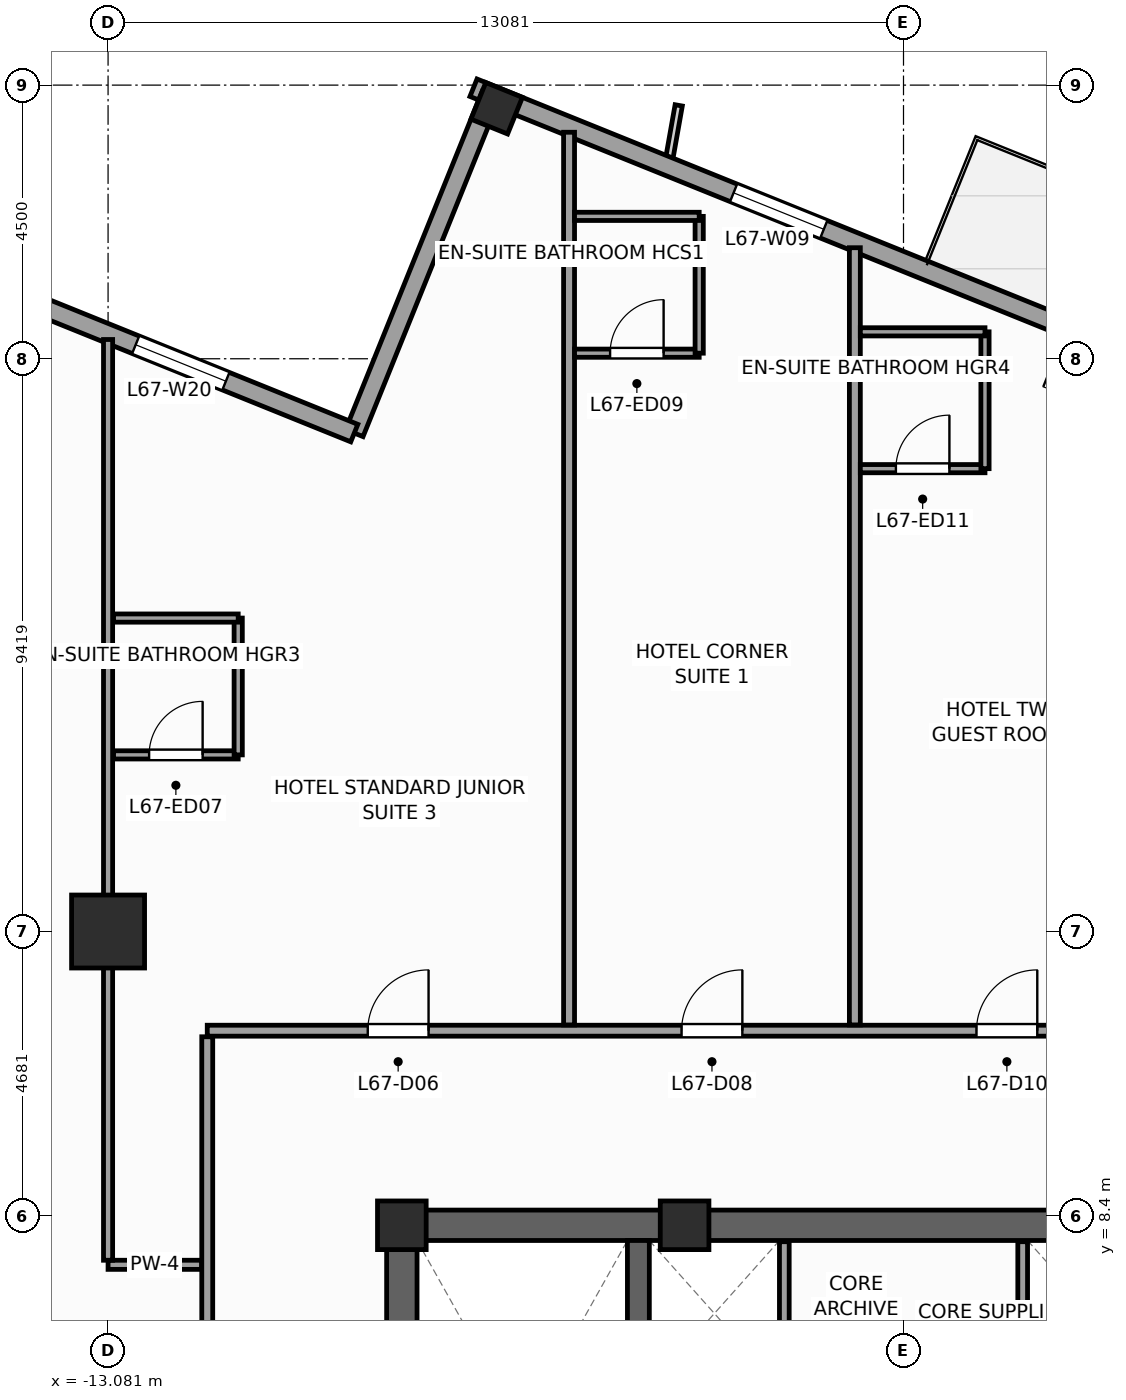
"""IFC4 building model, lengths in metres.
Left out: names, types, materials, properties, quantities, classifications, styles, units other than length and angle.
Written with IfcOpenShell. Run it as: python <this file> out.ifc"""

import sys

from ifc_helpers import new_model, si_unit, direction, frame, frame_2d, origin, origin_2d, place, context, subcontext, project, spatial, rectangle, extrude, source, transform, mapped, element, fill, save


model = new_model("IFC4")
c1 = context("Model", 3, precision=1e-05, world=origin(), true_north=direction((0.0, 1.0)))
c2 = subcontext(c1, "Body", "Model", "MODEL_VIEW")
j1 = project(units=[si_unit("LENGTHUNIT", "METRE"), si_unit("PLANEANGLEUNIT", "RADIAN")], contexts=[c1])
p1 = place(None, origin())
s1 = spatial("IfcSite", under=j1, at=p1, CompositionType="ELEMENT")
p2 = place(p1, origin())
s2 = spatial("IfcBuilding", under=s1, at=p2, CompositionType="ELEMENT")
p3 = place(p2, frame((0.0, 0.0, 276.0)))
s3 = spatial("IfcBuildingStorey", under=s2, at=p3, CompositionType="ELEMENT", Elevation=276.0)
p4 = place(p3, frame((-8.5, 8.25, 0.0), z_axis=(0.0, 0.0, 1.0), x_axis=(1.0, 0.0, 0.0)))
e1 = element("IfcWall", 1, at=p4, inside=s3, PredefinedType="SHEAR", context=c2, shape_type="SweptSolid", body=[
    extrude(rectangle(XDim=17.0, YDim=0.5, at=frame_2d((8.5, 0.0))), origin(), (0.0, 0.0, 1.0), 3.6),
])
p5 = place(p3, frame((-8.25, -8.0, 0.0), z_axis=(0.0, 0.0, 1.0), x_axis=(0.0, 1.0, 0.0)))
e2 = element("IfcWall", 2, at=p5, inside=s3, PredefinedType="SHEAR", context=c2, shape_type="SweptSolid", body=[
    extrude(rectangle(XDim=16.0, YDim=0.5, at=frame_2d((8.0, 0.0))), origin(), (0.0, 0.0, 1.0), 3.6),
])
p6 = place(p5, frame((4.69, 0.0, 0.0)))
e3 = element("IfcOpeningElement", 3, at=p6, cuts=e2, PredefinedType="OPENING", context=c2, shape_type="SweptSolid", body=[
    extrude(rectangle(XDim=1.3, YDim=2.2, at=frame_2d((0.65, 1.1))), frame((0.0, 0.26, 0.0), z_axis=(0.0, -1.0, 0.0), x_axis=(1.0, 0.0, 0.0)), (0.0, 0.0, 1.0), 0.52),
])
p7 = place(p3, frame((-4.36, -8.0, 0.0), z_axis=(0.0, 0.0, 1.0), x_axis=(0.0, 1.0, 0.0)))
e4 = element("IfcWall", 4, at=p7, inside=s3, PredefinedType="SHEAR", context=c2, shape_type="SweptSolid", body=[
    extrude(rectangle(XDim=16.0, YDim=0.36, at=frame_2d((8.0, 0.0))), origin(), (0.0, 0.0, 1.0), 3.6),
])
m1 = source(origin(), c2, "Body", "SweptSolid", [
    extrude(rectangle(XDim=0.8, YDim=0.8, at=origin_2d()), origin(), (0.0, 0.0, 1.0), 3.6),
])
for number, where, z_axis, x_axis in (
    (5, (-8.25, 8.25, 0.0), (0.0, 0.0, 1.0), (1.0, 0.0, 0.0)),
    (6, (-3.6, 8.25, 0.0), (0.0, 0.0, 1.0), (1.0, 0.0, 0.0)),
):
    element("IfcColumn", number, at=place(p3, frame(where, z_axis=z_axis, x_axis=x_axis)), inside=s3, PredefinedType="PILASTER", context=c2, shape_type="MappedRepresentation", body=[
        mapped(m1, transform((0.0, 0.0, 0.0), scale=1.0)),
    ])
m2 = source(origin(), c2, "Body", "SweptSolid", [
    extrude(rectangle(XDim=1.2, YDim=1.2, at=origin_2d()), origin(), (0.0, 0.0, 1.0), 3.6),
])
p8 = place(p3, frame((-13.081, 13.081, 0.0), z_axis=(0.0, 0.0, 1.0), x_axis=(1.0, 0.0, 0.0)))
e7 = element("IfcColumn", 7, at=p8, inside=s3, PredefinedType="COLUMN", context=c2, shape_type="MappedRepresentation", body=[
    mapped(m2, transform((0.0, 0.0, 0.0), scale=1.0)),
])
m3 = source(origin(), c2, "Body", "SweptSolid", [
    extrude(rectangle(XDim=0.65, YDim=0.65, at=origin_2d()), origin(), (0.0, 0.0, 1.0), 3.6),
])
p9 = place(p3, frame((-6.69, 26.62, 0.0), z_axis=(0.0, 0.0, 1.0), x_axis=(0.374606593416, 0.927183854567, 0.0)))
e8 = element("IfcColumn", 8, at=p9, inside=s3, PredefinedType="COLUMN", context=c2, shape_type="MappedRepresentation", body=[
    mapped(m3, transform((0.0, 0.0, 0.0), scale=1.0)),
])
p10 = place(p3, frame((23.813, 14.479, 0.0), z_axis=(0.0, 0.0, 1.0), x_axis=(-0.927182657188, 0.374609557019, 0.0)))
e9 = element("IfcWall", 9, at=p10, inside=s3, PredefinedType="STANDARD", context=c2, shape_type="SweptSolid", body=[
    extrude(rectangle(XDim=33.31, YDim=0.31, at=frame_2d((16.655, 0.0))), origin(), (0.0, 0.0, 1.0), 2.75),
])
p11 = place(p10, frame((21.73, 0.0, 0.0)))
e10 = element("IfcOpeningElement", 10, at=p11, cuts=e9, PredefinedType="OPENING", context=c2, shape_type="SweptSolid", body=[
    extrude(rectangle(XDim=1.05, YDim=2.25, at=frame_2d((0.525, 1.125))), frame((0.0, 0.165, 0.0), z_axis=(0.0, -1.0, 0.0), x_axis=(1.0, 0.0, 0.0)), (0.0, 0.0, 1.0), 0.33),
])
p12 = place(p10, frame((3.197, 0.0, 0.47)))
e11 = element("IfcOpeningElement", 11, at=p12, cuts=e9, PredefinedType="OPENING", context=c2, shape_type="SweptSolid", body=[
    extrude(rectangle(XDim=1.6, YDim=2.1, at=frame_2d((0.8, 1.05))), frame((0.0, 0.165, 0.0), z_axis=(0.0, -1.0, 0.0), x_axis=(1.0, 0.0, 0.0)), (0.0, 0.0, 1.0), 0.33),
])
p13 = place(p10, frame((8.86, 0.0, 0.47)))
e12 = element("IfcOpeningElement", 12, at=p13, cuts=e9, PredefinedType="OPENING", context=c2, shape_type="SweptSolid", body=[
    extrude(rectangle(XDim=1.6, YDim=2.1, at=frame_2d((0.8, 1.05))), frame((0.0, 0.165, 0.0), z_axis=(0.0, -1.0, 0.0), x_axis=(1.0, 0.0, 0.0)), (0.0, 0.0, 1.0), 0.33),
])
p14 = place(p10, frame((14.439, 0.0, 0.47)))
e13 = element("IfcOpeningElement", 13, at=p14, cuts=e9, PredefinedType="OPENING", context=c2, shape_type="SweptSolid", body=[
    extrude(rectangle(XDim=1.6, YDim=2.1, at=frame_2d((0.8, 1.05))), frame((0.0, 0.165, 0.0), z_axis=(0.0, -1.0, 0.0), x_axis=(1.0, 0.0, 0.0)), (0.0, 0.0, 1.0), 0.33),
])
p15 = place(p10, frame((27.097, 0.0, 0.47)))
e14 = element("IfcOpeningElement", 14, at=p15, cuts=e9, PredefinedType="OPENING", context=c2, shape_type="SweptSolid", body=[
    extrude(rectangle(XDim=1.6, YDim=2.1, at=frame_2d((0.8, 1.05))), frame((0.0, 0.165, 0.0), z_axis=(0.0, -1.0, 0.0), x_axis=(1.0, 0.0, 0.0)), (0.0, 0.0, 1.0), 0.33),
])
p16 = place(p3, frame((-6.784, 26.841, 0.0), z_axis=(0.0, 0.0, 1.0), x_axis=(-0.374636620962, -0.927171722085, 0.0)))
e15 = element("IfcWall", 15, at=p16, inside=s3, PredefinedType="STANDARD", context=c2, shape_type="SweptSolid", body=[
    extrude(rectangle(XDim=6.0, YDim=0.31, at=frame_2d((3.0, 0.0))), origin(), (0.0, 0.0, 1.0), 2.65),
])
p17 = place(p3, frame((-9.032, 21.278, 0.0), z_axis=(0.0, 0.0, 1.0), x_axis=(-0.927185411764, 0.374602739196, 0.0)))
e16 = element("IfcWall", 16, at=p17, inside=s3, PredefinedType="STANDARD", context=c2, shape_type="SweptSolid", body=[
    extrude(rectangle(XDim=6.155, YDim=0.31, at=frame_2d((3.078, 0.0))), origin(), (0.0, 0.0, 1.0), 3.35),
])
p18 = place(p17, frame((2.278, 0.0, 0.47)))
e17 = element("IfcOpeningElement", 17, at=p18, cuts=e16, PredefinedType="OPENING", context=c2, shape_type="SweptSolid", body=[
    extrude(rectangle(XDim=1.6, YDim=2.1, at=frame_2d((0.8, 1.05))), frame((0.0, 0.165, 0.0), z_axis=(0.0, -1.0, 0.0), x_axis=(1.0, 0.0, 0.0)), (0.0, 0.0, 1.0), 0.33),
])
for number, where, z_axis, x_axis in (
    (18, (-1.96, 4.58, 0.0), (0.0, 0.0, 1.0), (0.0, 1.0, 0.0)),
    (19, (1.96, 4.58, 0.0), (0.0, 0.0, 1.0), (0.0, 1.0, 0.0)),
):
    element("IfcWall", number, at=place(p3, frame(where, z_axis=z_axis, x_axis=x_axis)), inside=s3, PredefinedType="PARTITIONING", context=c2, shape_type="SweptSolid", body=[
        extrude(rectangle(XDim=3.4, YDim=0.16, at=frame_2d((1.7, 0.0))), origin(), (0.0, 0.0, 1.0), 3.35),
    ])
p19 = place(p3, frame((-11.45, 11.45, 0.0), z_axis=(0.0, 0.0, 1.0), x_axis=(1.0, 0.0, 0.0)))
e20 = element("IfcWall", 20, at=p19, inside=s3, PredefinedType="PARTITIONING", context=c2, shape_type="SweptSolid", body=[
    extrude(rectangle(XDim=21.75, YDim=0.18, at=frame_2d((10.875, 0.0))), origin(), (0.0, 0.0, 1.0), 3.35),
])
p20 = place(p19, frame((2.639, 0.0, 0.0)))
e21 = element("IfcOpeningElement", 21, at=p20, cuts=e20, PredefinedType="OPENING", context=c2, shape_type="SweptSolid", body=[
    extrude(rectangle(XDim=1.0, YDim=2.15, at=frame_2d((0.5, 1.075))), frame((0.0, 0.1, 0.0), z_axis=(0.0, -1.0, 0.0), x_axis=(1.0, 0.0, 0.0)), (0.0, 0.0, 1.0), 0.2),
])
p21 = place(p19, frame((7.8, 0.0, 0.0)))
e22 = element("IfcOpeningElement", 22, at=p21, cuts=e20, PredefinedType="OPENING", context=c2, shape_type="SweptSolid", body=[
    extrude(rectangle(XDim=1.0, YDim=2.15, at=frame_2d((0.5, 1.075))), frame((0.0, 0.1, 0.0), z_axis=(0.0, -1.0, 0.0), x_axis=(1.0, 0.0, 0.0)), (0.0, 0.0, 1.0), 0.2),
])
p22 = place(p19, frame((12.65, 0.0, 0.0)))
e23 = element("IfcOpeningElement", 23, at=p22, cuts=e20, PredefinedType="OPENING", context=c2, shape_type="SweptSolid", body=[
    extrude(rectangle(XDim=1.0, YDim=2.15, at=frame_2d((0.5, 1.075))), frame((0.0, 0.1, 0.0), z_axis=(0.0, -1.0, 0.0), x_axis=(1.0, 0.0, 0.0)), (0.0, 0.0, 1.0), 0.2),
])
p23 = place(p19, frame((18.036, 0.0, 0.0)))
e24 = element("IfcOpeningElement", 24, at=p23, cuts=e20, PredefinedType="OPENING", context=c2, shape_type="SweptSolid", body=[
    extrude(rectangle(XDim=1.0, YDim=2.15, at=frame_2d((0.5, 1.075))), frame((0.0, 0.1, 0.0), z_axis=(0.0, -1.0, 0.0), x_axis=(1.0, 0.0, 0.0)), (0.0, 0.0, 1.0), 0.2),
])
p24 = place(p3, frame((-11.45, -12.35, 0.0), z_axis=(0.0, 0.0, 1.0), x_axis=(0.0, 1.0, 0.0)))
e25 = element("IfcWall", 25, at=p24, inside=s3, PredefinedType="PARTITIONING", context=c2, shape_type="SweptSolid", body=[
    extrude(rectangle(XDim=23.7, YDim=0.18, at=frame_2d((11.85, 0.0))), origin(), (0.0, 0.0, 1.0), 3.35),
])
p25 = place(p24, frame((13.75, 0.0, 0.0)))
e26 = element("IfcOpeningElement", 26, at=p25, cuts=e25, PredefinedType="OPENING", context=c2, shape_type="SweptSolid", body=[
    extrude(rectangle(XDim=1.0, YDim=2.15, at=frame_2d((0.5, 1.075))), frame((0.0, 0.1, 0.0), z_axis=(0.0, -1.0, 0.0), x_axis=(1.0, 0.0, 0.0)), (0.0, 0.0, 1.0), 0.2),
])
p26 = place(p24, frame((17.55, 0.0, 0.0)))
e27 = element("IfcOpeningElement", 27, at=p26, cuts=e25, PredefinedType="OPENING", context=c2, shape_type="SweptSolid", body=[
    extrude(rectangle(XDim=1.0, YDim=2.15, at=frame_2d((0.5, 1.075))), frame((0.0, 0.1, 0.0), z_axis=(0.0, -1.0, 0.0), x_axis=(1.0, 0.0, 0.0)), (0.0, 0.0, 1.0), 0.2),
])
p27 = place(p24, frame((6.15, 0.0, 0.0)))
e28 = element("IfcOpeningElement", 28, at=p27, cuts=e25, PredefinedType="OPENING", context=c2, shape_type="SweptSolid", body=[
    extrude(rectangle(XDim=1.0, YDim=2.15, at=frame_2d((0.5, 1.075))), frame((0.0, 0.1, 0.0), z_axis=(0.0, -1.0, 0.0), x_axis=(1.0, 0.0, 0.0)), (0.0, 0.0, 1.0), 0.2),
])
p28 = place(p24, frame((9.95, 0.0, 0.0)))
e29 = element("IfcOpeningElement", 29, at=p28, cuts=e25, PredefinedType="OPENING", context=c2, shape_type="SweptSolid", body=[
    extrude(rectangle(XDim=1.0, YDim=2.15, at=frame_2d((0.5, 1.075))), frame((0.0, 0.1, 0.0), z_axis=(0.0, -1.0, 0.0), x_axis=(1.0, 0.0, 0.0)), (0.0, 0.0, 1.0), 0.2),
])
p29 = place(p3, frame((-5.5, 11.545, 0.0), z_axis=(0.0, 0.0, 1.0), x_axis=(0.0, 1.0, 0.0)))
e30 = element("IfcWall", 30, at=p29, inside=s3, PredefinedType="PARTITIONING", context=c2, shape_type="SweptSolid", body=[
    extrude(rectangle(XDim=14.68, YDim=0.18, at=frame_2d((7.34, 0.0))), origin(), (0.0, 0.0, 1.0), 3.35),
])
p30 = place(p3, frame((-0.8, 11.545, 0.0), z_axis=(0.0, 0.0, 1.0), x_axis=(0.0, 1.0, 0.0)))
e31 = element("IfcWall", 31, at=p30, inside=s3, PredefinedType="PARTITIONING", context=c2, shape_type="SweptSolid", body=[
    extrude(rectangle(XDim=12.781, YDim=0.18, at=frame_2d((6.391, 0.0))), origin(), (0.0, 0.0, 1.0), 3.35),
])
p31 = place(p3, frame((-11.545, 7.6, 0.0), z_axis=(0.0, 0.0, 1.0), x_axis=(-1.0, 0.0, 0.0)))
e32 = element("IfcWall", 32, at=p31, inside=s3, PredefinedType="PARTITIONING", context=c2, shape_type="SweptSolid", body=[
    extrude(rectangle(XDim=1.536, YDim=0.15, at=frame_2d((0.768, 0.0))), origin(), (0.0, 0.0, 1.0), 3.35),
])
p32 = place(p3, frame((-13.081, 7.675, 0.0), z_axis=(0.0, 0.0, 1.0), x_axis=(0.0, 1.0, 0.0)))
e33 = element("IfcWall", 33, at=p32, inside=s3, PredefinedType="PARTITIONING", context=c2, shape_type="SweptSolid", body=[
    extrude(rectangle(XDim=15.142, YDim=0.15, at=frame_2d((7.571, 0.0))), origin(), (0.0, 0.0, 1.0), 2.45),
])
p33 = place(p3, frame((-12.991, 15.986, 0.0), z_axis=(0.0, 0.0, 1.0), x_axis=(1.0, 0.0, 0.0)))
e34 = element("IfcWall", 34, at=p33, inside=s3, PredefinedType="PARTITIONING", context=c2, shape_type="SweptSolid", body=[
    extrude(rectangle(XDim=2.05, YDim=0.135, at=frame_2d((1.025, 0.0))), origin(), (0.0, 0.0, 1.0), 3.35),
])
p34 = place(p33, frame((0.585, 0.0, 0.0)))
e35 = element("IfcOpeningElement", 35, at=p34, cuts=e34, PredefinedType="OPENING", context=c2, shape_type="SweptSolid", body=[
    extrude(rectangle(XDim=0.88, YDim=2.1, at=frame_2d((0.44, 1.05))), frame((0.0, 0.078, 0.0), z_axis=(0.0, -1.0, 0.0), x_axis=(1.0, 0.0, 0.0)), (0.0, 0.0, 1.0), 0.155),
])
p35 = place(p3, frame((-10.941, 15.986, 0.0), z_axis=(0.0, 0.0, 1.0), x_axis=(0.0, 1.0, 0.0)))
e36 = element("IfcWall", 36, at=p35, inside=s3, PredefinedType="PARTITIONING", context=c2, shape_type="SweptSolid", body=[
    extrude(rectangle(XDim=2.25, YDim=0.135, at=frame_2d((1.125, 0.0))), origin(), (0.0, 0.0, 1.0), 3.35),
])
p36 = place(p3, frame((-12.991, 18.236, 0.0), z_axis=(0.0, 0.0, 1.0), x_axis=(1.0, 0.0, 0.0)))
e37 = element("IfcWall", 37, at=p36, inside=s3, PredefinedType="PARTITIONING", context=c2, shape_type="SweptSolid", body=[
    extrude(rectangle(XDim=2.05, YDim=0.135, at=frame_2d((1.025, 0.0))), origin(), (0.0, 0.0, 1.0), 3.35),
])
p37 = place(p3, frame((-5.41, 22.592, 0.0), z_axis=(0.0, 0.0, 1.0), x_axis=(1.0, 0.0, 0.0)))
e38 = element("IfcWall", 38, at=p37, inside=s3, PredefinedType="PARTITIONING", context=c2, shape_type="SweptSolid", body=[
    extrude(rectangle(XDim=2.05, YDim=0.135, at=frame_2d((1.025, 0.0))), origin(), (0.0, 0.0, 1.0), 3.35),
])
p38 = place(p37, frame((0.585, 0.0, 0.0)))
e39 = element("IfcOpeningElement", 39, at=p38, cuts=e38, PredefinedType="OPENING", context=c2, shape_type="SweptSolid", body=[
    extrude(rectangle(XDim=0.88, YDim=2.1, at=frame_2d((0.44, 1.05))), frame((0.0, 0.078, 0.0), z_axis=(0.0, -1.0, 0.0), x_axis=(1.0, 0.0, 0.0)), (0.0, 0.0, 1.0), 0.155),
])
p39 = place(p3, frame((-3.36, 22.592, 0.0), z_axis=(0.0, 0.0, 1.0), x_axis=(0.0, 1.0, 0.0)))
e40 = element("IfcWall", 40, at=p39, inside=s3, PredefinedType="PARTITIONING", context=c2, shape_type="SweptSolid", body=[
    extrude(rectangle(XDim=2.25, YDim=0.135, at=frame_2d((1.125, 0.0))), origin(), (0.0, 0.0, 1.0), 3.35),
])
p40 = place(p3, frame((-5.41, 24.842, 0.0), z_axis=(0.0, 0.0, 1.0), x_axis=(1.0, 0.0, 0.0)))
e41 = element("IfcWall", 41, at=p40, inside=s3, PredefinedType="PARTITIONING", context=c2, shape_type="SweptSolid", body=[
    extrude(rectangle(XDim=2.05, YDim=0.135, at=frame_2d((1.025, 0.0))), origin(), (0.0, 0.0, 1.0), 3.35),
])
p41 = place(p3, frame((-0.71, 20.693, 0.0), z_axis=(0.0, 0.0, 1.0), x_axis=(1.0, 0.0, 0.0)))
e42 = element("IfcWall", 42, at=p41, inside=s3, PredefinedType="PARTITIONING", context=c2, shape_type="SweptSolid", body=[
    extrude(rectangle(XDim=2.05, YDim=0.135, at=frame_2d((1.025, 0.0))), origin(), (0.0, 0.0, 1.0), 3.35),
])
p42 = place(p41, frame((0.585, 0.0, 0.0)))
e43 = element("IfcOpeningElement", 43, at=p42, cuts=e42, PredefinedType="OPENING", context=c2, shape_type="SweptSolid", body=[
    extrude(rectangle(XDim=0.88, YDim=2.1, at=frame_2d((0.44, 1.05))), frame((0.0, 0.078, 0.0), z_axis=(0.0, -1.0, 0.0), x_axis=(1.0, 0.0, 0.0)), (0.0, 0.0, 1.0), 0.155),
])
p43 = place(p3, frame((1.34, 20.693, 0.0), z_axis=(0.0, 0.0, 1.0), x_axis=(0.0, 1.0, 0.0)))
e44 = element("IfcWall", 44, at=p43, inside=s3, PredefinedType="PARTITIONING", context=c2, shape_type="SweptSolid", body=[
    extrude(rectangle(XDim=2.25, YDim=0.135, at=frame_2d((1.125, 0.0))), origin(), (0.0, 0.0, 1.0), 3.35),
])
p44 = place(p3, frame((-0.71, 22.943, 0.0), z_axis=(0.0, 0.0, 1.0), x_axis=(1.0, 0.0, 0.0)))
e45 = element("IfcWall", 45, at=p44, inside=s3, PredefinedType="PARTITIONING", context=c2, shape_type="SweptSolid", body=[
    extrude(rectangle(XDim=2.05, YDim=0.135, at=frame_2d((1.025, 0.0))), origin(), (0.0, 0.0, 1.0), 3.35),
])
m4 = source(origin(), c2, "Body", "SweptSolid", [
    extrude(rectangle(XDim=1.6, YDim=2.1, at=frame_2d((0.8, 1.05))), frame((0.0, 0.03, 0.0), z_axis=(0.0, -1.0, 0.0), x_axis=(1.0, 0.0, 0.0)), (0.0, 0.0, 1.0), 0.06),
])
p45 = place(p15, origin())
e46 = element("IfcWindow", 46, at=p45, inside=s3, PartitioningType="SINGLE_PANEL", PredefinedType="WINDOW", context=c2, shape_type="MappedRepresentation", body=[
    mapped(m4, transform((0.0, 0.0, 0.0), scale=1.0)),
])
fill(e14, e46)
p46 = place(p18, origin())
e47 = element("IfcWindow", 47, at=p46, inside=s3, PartitioningType="SINGLE_PANEL", PredefinedType="WINDOW", context=c2, shape_type="MappedRepresentation", body=[
    mapped(m4, transform((0.0, 0.0, 0.0), scale=1.0)),
])
fill(e17, e47)
m5 = source(origin(), c2, "Body", "SweptSolid", [
    extrude(rectangle(XDim=1.0, YDim=2.15, at=frame_2d((0.5, 1.075))), frame((0.0, 0.025, 0.0), z_axis=(0.0, -1.0, 0.0), x_axis=(1.0, 0.0, 0.0)), (0.0, 0.0, 1.0), 0.05),
])
p47 = place(p20, origin())
e48 = element("IfcDoor", 48, at=p47, inside=s3, OperationType="SINGLE_SWING_RIGHT", PredefinedType="DOOR", context=c2, shape_type="MappedRepresentation", body=[
    mapped(m5, transform((0.0, 0.0, 0.0), scale=1.0)),
])
fill(e21, e48)
m6 = source(origin(), c2, "Body", "SweptSolid", [
    extrude(rectangle(XDim=0.88, YDim=2.1, at=frame_2d((0.44, 1.05))), frame((0.0, 0.025, 0.0), z_axis=(0.0, -1.0, 0.0), x_axis=(1.0, 0.0, 0.0)), (0.0, 0.0, 1.0), 0.05),
])
p48 = place(p34, origin())
e49 = element("IfcDoor", 49, at=p48, inside=s3, OperationType="SINGLE_SWING_RIGHT", PredefinedType="DOOR", context=c2, shape_type="MappedRepresentation", body=[
    mapped(m6, transform((0.0, 0.0, 0.0), scale=1.0)),
])
fill(e35, e49)
p49 = place(p21, origin())
e50 = element("IfcDoor", 50, at=p49, inside=s3, OperationType="SINGLE_SWING_RIGHT", PredefinedType="DOOR", context=c2, shape_type="MappedRepresentation", body=[
    mapped(m5, transform((0.0, 0.0, 0.0), scale=1.0)),
])
fill(e22, e50)
p50 = place(p38, origin())
e51 = element("IfcDoor", 51, at=p50, inside=s3, OperationType="SINGLE_SWING_RIGHT", PredefinedType="DOOR", context=c2, shape_type="MappedRepresentation", body=[
    mapped(m6, transform((0.0, 0.0, 0.0), scale=1.0)),
])
fill(e39, e51)
p51 = place(p22, origin())
e52 = element("IfcDoor", 52, at=p51, inside=s3, OperationType="SINGLE_SWING_RIGHT", PredefinedType="DOOR", context=c2, shape_type="MappedRepresentation", body=[
    mapped(m5, transform((0.0, 0.0, 0.0), scale=1.0)),
])
fill(e23, e52)
p52 = place(p42, origin())
e53 = element("IfcDoor", 53, at=p52, inside=s3, OperationType="SINGLE_SWING_RIGHT", PredefinedType="DOOR", context=c2, shape_type="MappedRepresentation", body=[
    mapped(m6, transform((0.0, 0.0, 0.0), scale=1.0)),
])
fill(e43, e53)
save(model, sys.argv[1])
